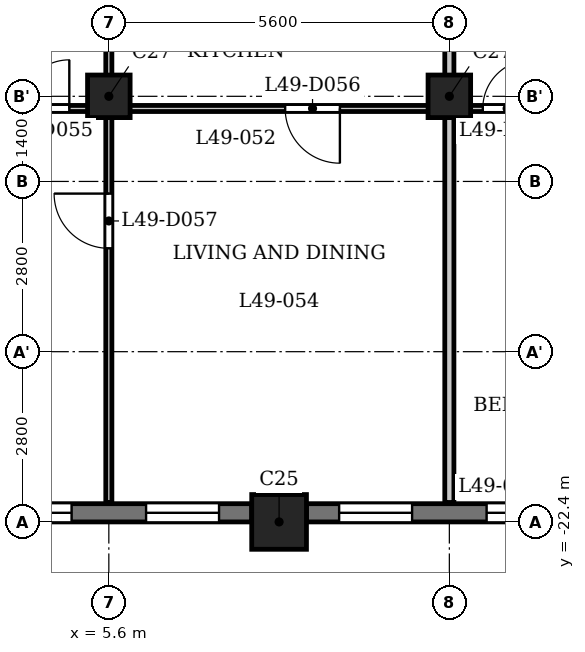
"""IFC4 building model, lengths in metres.
Left out: names, types, materials, properties, quantities, classifications, styles, units other than length and angle.
Written with IfcOpenShell. Run it as: python <this file> out.ifc"""

import sys

from ifc_helpers import new_model, si_unit, direction, frame, frame_2d, origin, origin_2d, place, context, subcontext, project, spatial, rectangle, extrude, element, fill, save


model = new_model("IFC4")
c1 = context("Model", 3, precision=1e-05, world=origin(), true_north=direction((0.0, 1.0)))
c2 = subcontext(c1, "Body", "Model", "MODEL_VIEW")
j1 = project(units=[si_unit("LENGTHUNIT", "METRE"), si_unit("PLANEANGLEUNIT", "RADIAN")], contexts=[c1])
p1 = place(None, origin())
s1 = spatial("IfcSite", under=j1, at=p1, CompositionType="ELEMENT")
p2 = place(p1, origin())
s2 = spatial("IfcBuilding", under=s1, at=p2, CompositionType="ELEMENT")
p3 = place(p2, frame((0.0, 0.0, 192.4)))
s3 = spatial("IfcBuildingStorey", under=s2, at=p3, CompositionType="ELEMENT", Elevation=192.4)
p4 = place(p3, frame((8.4, -22.4, 0.0), z_axis=(0.0, 0.0, 1.0), x_axis=(1.0, 0.0, 0.0)))
e1 = element("IfcColumn", 1, at=p4, inside=s3, PredefinedType="COLUMN", context=c2, shape_type="SweptSolid", body=[
    extrude(rectangle(XDim=0.9, YDim=0.9, at=origin_2d()), origin(), (0.0, 0.0, 1.0), 3.5),
])
for number, where, z_axis, x_axis in (
    (2, (5.6, -15.4, 0.0), (0.0, 0.0, 1.0), (1.0, 0.0, 0.0)),
    (3, (11.2, -15.4, 0.0), (0.0, 0.0, 1.0), (1.0, 0.0, 0.0)),
):
    element("IfcColumn", number, at=place(p3, frame(where, z_axis=z_axis, x_axis=x_axis)), inside=s3, PredefinedType="COLUMN", context=c2, shape_type="SweptSolid", body=[
        extrude(rectangle(XDim=0.7, YDim=0.7, at=origin_2d()), origin(), (0.0, 0.0, 1.0), 3.5),
    ])
p5 = place(p3, frame((3.25, -22.25, 0.0), z_axis=(0.0, 0.0, 1.0), x_axis=(1.0, 0.0, 0.0)))
e4 = element("IfcWall", 4, at=p5, inside=s3, PredefinedType="SOLIDWALL", context=c2, shape_type="SweptSolid", body=[
    extrude(rectangle(XDim=4.7, YDim=0.3, at=frame_2d((2.35, 0.0))), origin(), (0.0, 0.0, 1.0), 2.5),
])
p6 = place(p5, frame((0.538, 0.0, 0.6)))
e5 = element("IfcOpeningElement", 5, at=p6, cuts=e4, PredefinedType="OPENING", context=c2, shape_type="SweptSolid", body=[
    extrude(rectangle(XDim=1.2, YDim=1.55, at=frame_2d((0.6, 0.775))), frame((0.0, 0.16, 0.0), z_axis=(0.0, -1.0, 0.0), x_axis=(1.0, 0.0, 0.0)), (0.0, 0.0, 1.0), 0.32),
])
p7 = place(p5, frame((2.962, 0.0, 0.6)))
e6 = element("IfcOpeningElement", 6, at=p7, cuts=e4, PredefinedType="OPENING", context=c2, shape_type="SweptSolid", body=[
    extrude(rectangle(XDim=1.2, YDim=1.55, at=frame_2d((0.6, 0.775))), frame((0.0, 0.16, 0.0), z_axis=(0.0, -1.0, 0.0), x_axis=(1.0, 0.0, 0.0)), (0.0, 0.0, 1.0), 0.32),
])
p8 = place(p3, frame((8.85, -22.25, 0.0), z_axis=(0.0, 0.0, 1.0), x_axis=(1.0, 0.0, 0.0)))
e7 = element("IfcWall", 7, at=p8, inside=s3, PredefinedType="SOLIDWALL", context=c2, shape_type="SweptSolid", body=[
    extrude(rectangle(XDim=4.7, YDim=0.3, at=frame_2d((2.35, 0.0))), origin(), (0.0, 0.0, 1.0), 2.5),
])
p9 = place(p8, frame((0.538, 0.0, 0.6)))
e8 = element("IfcOpeningElement", 8, at=p9, cuts=e7, PredefinedType="OPENING", context=c2, shape_type="SweptSolid", body=[
    extrude(rectangle(XDim=1.2, YDim=1.55, at=frame_2d((0.6, 0.775))), frame((0.0, 0.16, 0.0), z_axis=(0.0, -1.0, 0.0), x_axis=(1.0, 0.0, 0.0)), (0.0, 0.0, 1.0), 0.32),
])
p10 = place(p8, frame((2.962, 0.0, 0.6)))
e9 = element("IfcOpeningElement", 9, at=p10, cuts=e7, PredefinedType="OPENING", context=c2, shape_type="SweptSolid", body=[
    extrude(rectangle(XDim=1.2, YDim=1.55, at=frame_2d((0.6, 0.775))), frame((0.0, 0.16, 0.0), z_axis=(0.0, -1.0, 0.0), x_axis=(1.0, 0.0, 0.0)), (0.0, 0.0, 1.0), 0.32),
])
p11 = place(p3, frame((-16.725, -15.6, 0.0), z_axis=(0.0, 0.0, 1.0), x_axis=(1.0, 0.0, 0.0)))
e10 = element("IfcWall", 10, at=p11, inside=s3, PredefinedType="PARTITIONING", context=c2, shape_type="SweptSolid", body=[
    extrude(rectangle(XDim=33.45, YDim=0.1, at=frame_2d((16.725, 0.0))), origin(), (0.0, 0.0, 1.0), 3.2),
])
p12 = place(p11, frame((4.075, 0.0, 0.0)))
e11 = element("IfcOpeningElement", 11, at=p12, cuts=e10, PredefinedType="OPENING", context=c2, shape_type="SweptSolid", body=[
    extrude(rectangle(XDim=0.8, YDim=2.1, at=frame_2d((0.4, 1.05))), frame((0.0, 0.06, 0.0), z_axis=(0.0, -1.0, 0.0), x_axis=(1.0, 0.0, 0.0)), (0.0, 0.0, 1.0), 0.12),
])
p13 = place(p11, frame((1.825, 0.0, 0.0)))
e12 = element("IfcOpeningElement", 12, at=p13, cuts=e10, PredefinedType="OPENING", context=c2, shape_type="SweptSolid", body=[
    extrude(rectangle(XDim=0.9, YDim=2.1, at=frame_2d((0.45, 1.05))), frame((0.0, 0.06, 0.0), z_axis=(0.0, -1.0, 0.0), x_axis=(1.0, 0.0, 0.0)), (0.0, 0.0, 1.0), 0.12),
])
p14 = place(p11, frame((9.675, 0.0, 0.0)))
e13 = element("IfcOpeningElement", 13, at=p14, cuts=e10, PredefinedType="OPENING", context=c2, shape_type="SweptSolid", body=[
    extrude(rectangle(XDim=0.8, YDim=2.1, at=frame_2d((0.4, 1.05))), frame((0.0, 0.06, 0.0), z_axis=(0.0, -1.0, 0.0), x_axis=(1.0, 0.0, 0.0)), (0.0, 0.0, 1.0), 0.12),
])
p15 = place(p11, frame((14.025, 0.0, 0.0)))
e14 = element("IfcOpeningElement", 14, at=p15, cuts=e10, PredefinedType="OPENING", context=c2, shape_type="SweptSolid", body=[
    extrude(rectangle(XDim=0.9, YDim=2.1, at=frame_2d((0.45, 1.05))), frame((0.0, 0.06, 0.0), z_axis=(0.0, -1.0, 0.0), x_axis=(1.0, 0.0, 0.0)), (0.0, 0.0, 1.0), 0.12),
])
p16 = place(p11, frame((20.875, 0.0, 0.0)))
e15 = element("IfcOpeningElement", 15, at=p16, cuts=e10, PredefinedType="OPENING", context=c2, shape_type="SweptSolid", body=[
    extrude(rectangle(XDim=0.8, YDim=2.1, at=frame_2d((0.4, 1.05))), frame((0.0, 0.06, 0.0), z_axis=(0.0, -1.0, 0.0), x_axis=(1.0, 0.0, 0.0)), (0.0, 0.0, 1.0), 0.12),
])
p17 = place(p11, frame((25.225, 0.0, 0.0)))
e16 = element("IfcOpeningElement", 16, at=p17, cuts=e10, PredefinedType="OPENING", context=c2, shape_type="SweptSolid", body=[
    extrude(rectangle(XDim=0.9, YDim=2.1, at=frame_2d((0.45, 1.05))), frame((0.0, 0.06, 0.0), z_axis=(0.0, -1.0, 0.0), x_axis=(1.0, 0.0, 0.0)), (0.0, 0.0, 1.0), 0.12),
])
p18 = place(p11, frame((28.475, 0.0, 0.0)))
e17 = element("IfcOpeningElement", 17, at=p18, cuts=e10, PredefinedType="OPENING", context=c2, shape_type="SweptSolid", body=[
    extrude(rectangle(XDim=0.8, YDim=2.1, at=frame_2d((0.4, 1.05))), frame((0.0, 0.06, 0.0), z_axis=(0.0, -1.0, 0.0), x_axis=(1.0, 0.0, 0.0)), (0.0, 0.0, 1.0), 0.12),
])
p19 = place(p11, frame((30.675, 0.0, 0.0)))
e18 = element("IfcOpeningElement", 18, at=p19, cuts=e10, PredefinedType="OPENING", context=c2, shape_type="SweptSolid", body=[
    extrude(rectangle(XDim=0.9, YDim=2.1, at=frame_2d((0.45, 1.05))), frame((0.0, 0.06, 0.0), z_axis=(0.0, -1.0, 0.0), x_axis=(1.0, 0.0, 0.0)), (0.0, 0.0, 1.0), 0.12),
])
p20 = place(p3, frame((5.6, -22.08, 0.0), z_axis=(0.0, 0.0, 1.0), x_axis=(0.0, 1.0, 0.0)))
e19 = element("IfcWall", 19, at=p20, inside=s3, PredefinedType="PARTITIONING", context=c2, shape_type="SweptSolid", body=[
    extrude(rectangle(XDim=6.43, YDim=0.1, at=frame_2d((3.215, 0.0))), origin(), (0.0, 0.0, 1.0), 3.2),
])
p21 = place(p20, frame((4.18, 0.0, 0.0)))
e20 = element("IfcOpeningElement", 20, at=p21, cuts=e19, PredefinedType="OPENING", context=c2, shape_type="SweptSolid", body=[
    extrude(rectangle(XDim=0.9, YDim=2.1, at=frame_2d((0.45, 1.05))), frame((0.0, 0.06, 0.0), z_axis=(0.0, -1.0, 0.0), x_axis=(1.0, 0.0, 0.0)), (0.0, 0.0, 1.0), 0.12),
])
p22 = place(p3, frame((5.6, -15.55, 0.0), z_axis=(0.0, 0.0, 1.0), x_axis=(0.0, 1.0, 0.0)))
e21 = element("IfcWall", 21, at=p22, inside=s3, PredefinedType="PARTITIONING", context=c2, shape_type="SweptSolid", body=[
    extrude(rectangle(XDim=2.275, YDim=0.1, at=frame_2d((1.138, 0.0))), origin(), (0.0, 0.0, 1.0), 3.2),
])
p23 = place(p3, frame((11.2, -22.08, 0.0), z_axis=(0.0, 0.0, 1.0), x_axis=(0.0, 1.0, 0.0)))
e22 = element("IfcWall", 22, at=p23, inside=s3, PredefinedType="PARTITIONING", context=c2, shape_type="SweptSolid", body=[
    extrude(rectangle(XDim=6.43, YDim=0.15, at=frame_2d((3.215, 0.0))), origin(), (0.0, 0.0, 1.0), 3.2),
])
p24 = place(p3, frame((11.2, -15.55, 0.0), z_axis=(0.0, 0.0, 1.0), x_axis=(0.0, 1.0, 0.0)))
e23 = element("IfcWall", 23, at=p24, inside=s3, PredefinedType="PARTITIONING", context=c2, shape_type="SweptSolid", body=[
    extrude(rectangle(XDim=2.275, YDim=0.15, at=frame_2d((1.138, 0.0))), origin(), (0.0, 0.0, 1.0), 3.2),
])
p25 = place(p16, origin())
e24 = element("IfcDoor", 24, at=p25, inside=s3, OperationType="SINGLE_SWING_LEFT", PredefinedType="DOOR", context=c2, shape_type="SweptSolid", body=[
    extrude(rectangle(XDim=0.8, YDim=2.1, at=frame_2d((0.4, 1.05))), frame((0.0, 0.025, 0.0), z_axis=(0.0, -1.0, 0.0), x_axis=(1.0, 0.0, 0.0)), (0.0, 0.0, 1.0), 0.05),
])
fill(e15, e24)
p26 = place(p17, origin())
e25 = element("IfcDoor", 25, at=p26, inside=s3, OperationType="SINGLE_SWING_RIGHT", PredefinedType="DOOR", context=c2, shape_type="SweptSolid", body=[
    extrude(rectangle(XDim=0.9, YDim=2.1, at=frame_2d((0.45, 1.05))), frame((0.0, 0.025, 0.0), z_axis=(0.0, -1.0, 0.0), x_axis=(1.0, 0.0, 0.0)), (0.0, 0.0, 1.0), 0.05),
])
fill(e16, e25)
p27 = place(p21, origin())
e26 = element("IfcDoor", 26, at=p27, inside=s3, OperationType="SINGLE_SWING_LEFT", PredefinedType="DOOR", context=c2, shape_type="SweptSolid", body=[
    extrude(rectangle(XDim=0.9, YDim=2.1, at=frame_2d((0.45, 1.05))), frame((0.0, 0.025, 0.0), z_axis=(0.0, -1.0, 0.0), x_axis=(1.0, 0.0, 0.0)), (0.0, 0.0, 1.0), 0.05),
])
fill(e20, e26)
p28 = place(p18, origin())
e27 = element("IfcDoor", 27, at=p28, inside=s3, OperationType="SINGLE_SWING_LEFT", PredefinedType="DOOR", context=c2, shape_type="SweptSolid", body=[
    extrude(rectangle(XDim=0.8, YDim=2.1, at=frame_2d((0.4, 1.05))), frame((0.0, 0.025, 0.0), z_axis=(0.0, -1.0, 0.0), x_axis=(1.0, 0.0, 0.0)), (0.0, 0.0, 1.0), 0.05),
])
fill(e17, e27)
p29 = place(p6, origin())
e28 = element("IfcWindow", 28, at=p29, inside=s3, PartitioningType="SINGLE_PANEL", PredefinedType="WINDOW", context=c2, shape_type="SweptSolid", body=[
    extrude(rectangle(XDim=1.2, YDim=1.55, at=frame_2d((0.6, 0.775))), frame((0.0, 0.03, 0.0), z_axis=(0.0, -1.0, 0.0), x_axis=(1.0, 0.0, 0.0)), (0.0, 0.0, 1.0), 0.06),
])
fill(e5, e28)
p30 = place(p7, origin())
e29 = element("IfcWindow", 29, at=p30, inside=s3, PartitioningType="SINGLE_PANEL", PredefinedType="WINDOW", context=c2, shape_type="SweptSolid", body=[
    extrude(rectangle(XDim=1.2, YDim=1.55, at=frame_2d((0.6, 0.775))), frame((0.0, 0.03, 0.0), z_axis=(0.0, -1.0, 0.0), x_axis=(1.0, 0.0, 0.0)), (0.0, 0.0, 1.0), 0.06),
])
fill(e6, e29)
p31 = place(p9, origin())
e30 = element("IfcWindow", 30, at=p31, inside=s3, PartitioningType="SINGLE_PANEL", PredefinedType="WINDOW", context=c2, shape_type="SweptSolid", body=[
    extrude(rectangle(XDim=1.2, YDim=1.55, at=frame_2d((0.6, 0.775))), frame((0.0, 0.03, 0.0), z_axis=(0.0, -1.0, 0.0), x_axis=(1.0, 0.0, 0.0)), (0.0, 0.0, 1.0), 0.06),
])
fill(e8, e30)
p32 = place(p10, origin())
e31 = element("IfcWindow", 31, at=p32, inside=s3, PartitioningType="SINGLE_PANEL", PredefinedType="WINDOW", context=c2, shape_type="SweptSolid", body=[
    extrude(rectangle(XDim=1.2, YDim=1.55, at=frame_2d((0.6, 0.775))), frame((0.0, 0.03, 0.0), z_axis=(0.0, -1.0, 0.0), x_axis=(1.0, 0.0, 0.0)), (0.0, 0.0, 1.0), 0.06),
])
fill(e9, e31)
save(model, sys.argv[1])
